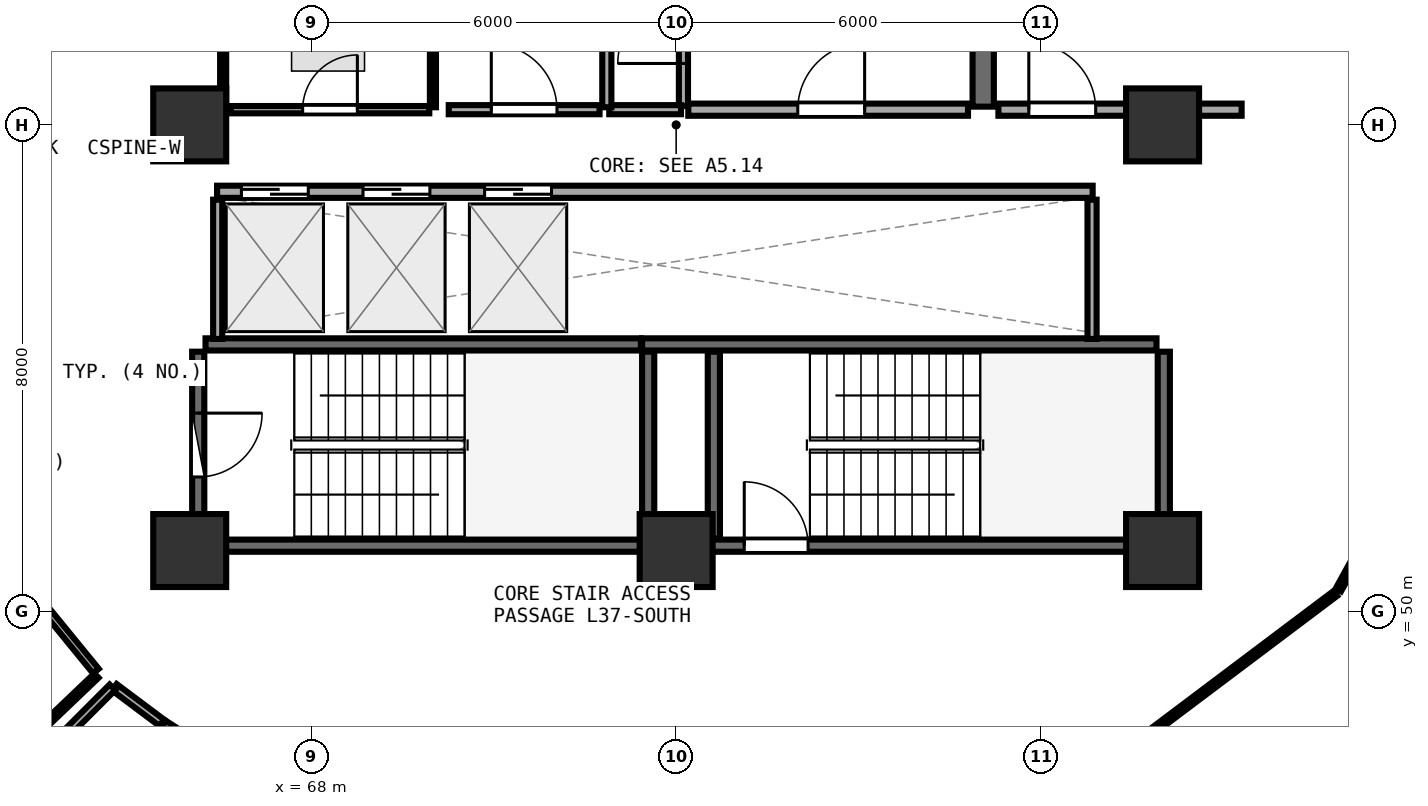
"""IFC4 building model, lengths in metres.
Left out: names, types, materials, properties, quantities, classifications, styles, units other than length and angle.
Written with IfcOpenShell. Run it as: python <this file> out.ifc"""

import sys

from ifc_helpers import new_model, si_unit, direction, frame, frame_2d, origin, origin_2d, place, context, subcontext, project, spatial, rectangle, extrude, element, fill, save


model = new_model("IFC4")
c1 = context("Model", 3, precision=1e-05, world=origin(), true_north=direction((0.0, 1.0)))
c2 = subcontext(c1, "Body", "Model", "MODEL_VIEW")
j1 = project(units=[si_unit("LENGTHUNIT", "METRE"), si_unit("PLANEANGLEUNIT", "RADIAN")], contexts=[c1])
p1 = place(None, origin())
s1 = spatial("IfcSite", under=j1, at=p1, CompositionType="ELEMENT")
p2 = place(p1, origin())
s2 = spatial("IfcBuilding", under=s1, at=p2, CompositionType="ELEMENT")
p3 = place(p2, frame((0.0, 0.0, 146.85)))
s3 = spatial("IfcBuildingStorey", under=s2, at=p3, CompositionType="ELEMENT", Elevation=146.85)
for number, where, z_axis, x_axis in (
    (1, (66.0, 51.0, 0.0), (0.0, 0.0, 1.0), (1.0, 0.0, 0.0)),
    (2, (74.0, 51.0, 0.0), (0.0, 0.0, 1.0), (1.0, 0.0, 0.0)),
    (3, (82.0, 51.0, 0.0), (0.0, 0.0, 1.0), (1.0, 0.0, 0.0)),
    (4, (82.0, 58.0, 0.0), (0.0, 0.0, 1.0), (1.0, 0.0, 0.0)),
    (5, (66.0, 58.0, 0.0), (0.0, 0.0, 1.0), (1.0, 0.0, 0.0)),
):
    element("IfcColumn", number, at=place(p3, frame(where, z_axis=z_axis, x_axis=x_axis)), inside=s3, PredefinedType="PILASTER", context=c2, shape_type="SweptSolid", body=[
        extrude(rectangle(XDim=1.2, YDim=1.2, at=origin_2d()), origin(), (0.0, 0.0, 1.0), 3.75),
    ])
p4 = place(p3, frame((74.0, 51.08, 0.0), z_axis=(0.0, 0.0, 1.0), x_axis=(1.0, 0.0, 0.0)))
e6 = element("IfcWall", 6, at=p4, inside=s3, PredefinedType="SHEAR", context=c2, shape_type="SweptSolid", body=[
    extrude(rectangle(XDim=7.9, YDim=0.2, at=frame_2d((3.95, 0.0))), origin(), (0.0, 0.0, 1.0), 3.49),
])
p5 = place(p4, frame((1.12, 0.0, 0.0)))
e7 = element("IfcOpeningElement", 7, at=p5, cuts=e6, PredefinedType="OPENING", context=c2, shape_type="SweptSolid", body=[
    extrude(rectangle(XDim=1.05, YDim=2.1, at=frame_2d((0.525, 1.05))), frame((0.0, 0.11, 0.0), z_axis=(0.0, -1.0, 0.0), x_axis=(1.0, 0.0, 0.0)), (0.0, 0.0, 1.0), 0.22),
])
p6 = place(p3, frame((82.02, 51.2, 0.0), z_axis=(0.0, 0.0, 1.0), x_axis=(0.0, 1.0, 0.0)))
e8 = element("IfcWall", 8, at=p6, inside=s3, PredefinedType="SHEAR", context=c2, shape_type="SweptSolid", body=[
    extrude(rectangle(XDim=3.07, YDim=0.2, at=frame_2d((1.535, 0.0))), origin(), (0.0, 0.0, 1.0), 3.49),
])
p7 = place(p3, frame((81.9, 54.39, 0.0), z_axis=(0.0, 0.0, 1.0), x_axis=(-1.0, 0.0, 0.0)))
e9 = element("IfcWall", 9, at=p7, inside=s3, PredefinedType="SHEAR", context=c2, shape_type="SweptSolid", body=[
    extrude(rectangle(XDim=8.46, YDim=0.2, at=frame_2d((4.23, 0.0))), origin(), (0.0, 0.0, 1.0), 3.49),
])
p8 = place(p3, frame((74.62, 54.27, 0.0), z_axis=(0.0, 0.0, 1.0), x_axis=(0.0, -1.0, 0.0)))
e10 = element("IfcWall", 10, at=p8, inside=s3, PredefinedType="SHEAR", context=c2, shape_type="SweptSolid", body=[
    extrude(rectangle(XDim=3.07, YDim=0.2, at=frame_2d((1.535, 0.0))), origin(), (0.0, 0.0, 1.0), 3.49),
])
p9 = place(p3, frame((66.26, 51.08, 0.0), z_axis=(0.0, 0.0, 1.0), x_axis=(1.0, 0.0, 0.0)))
e11 = element("IfcWall", 11, at=p9, inside=s3, PredefinedType="SHEAR", context=c2, shape_type="SweptSolid", body=[
    extrude(rectangle(XDim=7.16, YDim=0.2, at=frame_2d((3.58, 0.0))), origin(), (0.0, 0.0, 1.0), 3.49),
])
p10 = place(p3, frame((73.54, 51.2, 0.0), z_axis=(0.0, 0.0, 1.0), x_axis=(0.0, 1.0, 0.0)))
e12 = element("IfcWall", 12, at=p10, inside=s3, PredefinedType="SHEAR", context=c2, shape_type="SweptSolid", body=[
    extrude(rectangle(XDim=3.07, YDim=0.2, at=frame_2d((1.535, 0.0))), origin(), (0.0, 0.0, 1.0), 3.49),
])
p11 = place(p3, frame((73.42, 54.39, 0.0), z_axis=(0.0, 0.0, 1.0), x_axis=(-1.0, 0.0, 0.0)))
e13 = element("IfcWall", 13, at=p11, inside=s3, PredefinedType="SHEAR", context=c2, shape_type="SweptSolid", body=[
    extrude(rectangle(XDim=7.16, YDim=0.2, at=frame_2d((3.58, 0.0))), origin(), (0.0, 0.0, 1.0), 3.49),
])
p12 = place(p3, frame((66.14, 54.27, 0.0), z_axis=(0.0, 0.0, 1.0), x_axis=(0.0, -1.0, 0.0)))
e14 = element("IfcWall", 14, at=p12, inside=s3, PredefinedType="SHEAR", context=c2, shape_type="SweptSolid", body=[
    extrude(rectangle(XDim=3.07, YDim=0.2, at=frame_2d((1.535, 0.0))), origin(), (0.0, 0.0, 1.0), 3.49),
])
p13 = place(p12, frame((1.01, 0.0, 0.0)))
e15 = element("IfcOpeningElement", 15, at=p13, cuts=e14, PredefinedType="OPENING", context=c2, shape_type="SweptSolid", body=[
    extrude(rectangle(XDim=1.05, YDim=2.1, at=frame_2d((0.525, 1.05))), frame((0.0, 0.11, 0.0), z_axis=(0.0, -1.0, 0.0), x_axis=(1.0, 0.0, 0.0)), (0.0, 0.0, 1.0), 0.22),
])
p14 = place(p3, frame((79.05, 58.3, 0.0), z_axis=(0.0, 0.0, 1.0), x_axis=(0.0, 1.0, 0.0)))
e16 = element("IfcWall", 16, at=p14, inside=s3, PredefinedType="SHEAR", context=c2, shape_type="SweptSolid", body=[
    extrude(rectangle(XDim=6.3, YDim=0.35, at=frame_2d((3.15, 0.0))), origin(), (0.0, 0.0, 1.0), 3.49),
])
p15 = place(p3, frame((74.2, 58.25, 0.0), z_axis=(0.0, 0.0, 1.0), x_axis=(1.0, 0.0, 0.0)))
e17 = element("IfcWall", 17, at=p15, inside=s3, PredefinedType="SOLIDWALL", context=c2, shape_type="SweptSolid", body=[
    extrude(rectangle(XDim=4.6, YDim=0.2, at=frame_2d((2.3, 0.0))), origin(), (0.0, 0.0, 1.0), 3.48),
])
p16 = place(p15, frame((1.8, 0.0, 0.0)))
e18 = element("IfcOpeningElement", 18, at=p16, cuts=e17, PredefinedType="OPENING", context=c2, shape_type="SweptSolid", body=[
    extrude(rectangle(XDim=1.1, YDim=2.1, at=frame_2d((0.55, 1.05))), frame((0.0, 0.11, 0.0), z_axis=(0.0, -1.0, 0.0), x_axis=(1.0, 0.0, 0.0)), (0.0, 0.0, 1.0), 0.22),
])
p17 = place(p3, frame((79.3, 58.25, 0.0), z_axis=(0.0, 0.0, 1.0), x_axis=(1.0, 0.0, 0.0)))
e19 = element("IfcWall", 19, at=p17, inside=s3, PredefinedType="SOLIDWALL", context=c2, shape_type="SweptSolid", body=[
    extrude(rectangle(XDim=4.0, YDim=0.2, at=frame_2d((2.0, 0.0))), origin(), (0.0, 0.0, 1.0), 2.775),
])
p18 = place(p17, frame((0.5, 0.0, 0.0)))
e20 = element("IfcOpeningElement", 20, at=p18, cuts=e19, PredefinedType="OPENING", context=c2, shape_type="SweptSolid", body=[
    extrude(rectangle(XDim=1.1, YDim=2.1, at=frame_2d((0.55, 1.05))), frame((0.0, 0.11, 0.0), z_axis=(0.0, -1.0, 0.0), x_axis=(1.0, 0.0, 0.0)), (0.0, 0.0, 1.0), 0.22),
])
p19 = place(p3, frame((66.45, 56.9, 0.0), z_axis=(0.0, 0.0, 1.0), x_axis=(1.0, 0.0, 0.0)))
e21 = element("IfcWall", 21, at=p19, inside=s3, PredefinedType="SOLIDWALL", context=c2, shape_type="SweptSolid", body=[
    extrude(rectangle(XDim=14.4, YDim=0.2, at=frame_2d((7.2, 0.0))), origin(), (0.0, 0.0, 1.0), 3.48),
])
p20 = place(p19, frame((0.4, 0.0, 0.0)))
e22 = element("IfcOpeningElement", 22, at=p20, cuts=e21, PredefinedType="OPENING", context=c2, shape_type="SweptSolid", body=[
    extrude(rectangle(XDim=1.1, YDim=2.1, at=frame_2d((0.55, 1.05))), frame((0.0, 0.11, 0.0), z_axis=(0.0, -1.0, 0.0), x_axis=(1.0, 0.0, 0.0)), (0.0, 0.0, 1.0), 0.22),
])
p21 = place(p19, frame((2.4, 0.0, 0.0)))
e23 = element("IfcOpeningElement", 23, at=p21, cuts=e21, PredefinedType="OPENING", context=c2, shape_type="SweptSolid", body=[
    extrude(rectangle(XDim=1.1, YDim=2.1, at=frame_2d((0.55, 1.05))), frame((0.0, 0.11, 0.0), z_axis=(0.0, -1.0, 0.0), x_axis=(1.0, 0.0, 0.0)), (0.0, 0.0, 1.0), 0.22),
])
p22 = place(p19, frame((4.4, 0.0, 0.0)))
e24 = element("IfcOpeningElement", 24, at=p22, cuts=e21, PredefinedType="OPENING", context=c2, shape_type="SweptSolid", body=[
    extrude(rectangle(XDim=1.1, YDim=2.1, at=frame_2d((0.55, 1.05))), frame((0.0, 0.11, 0.0), z_axis=(0.0, -1.0, 0.0), x_axis=(1.0, 0.0, 0.0)), (0.0, 0.0, 1.0), 0.22),
])
for number, where, z_axis, x_axis in (
    (25, (66.46, 54.48, 0.0), (0.0, 0.0, 1.0), (0.0, 1.0, 0.0)),
    (26, (80.84, 54.48, 0.0), (0.0, 0.0, 1.0), (0.0, 1.0, 0.0)),
):
    element("IfcWall", number, at=place(p3, frame(where, z_axis=z_axis, x_axis=x_axis)), inside=s3, PredefinedType="PARTITIONING", context=c2, shape_type="SweptSolid", body=[
        extrude(rectangle(XDim=2.29, YDim=0.15, at=frame_2d((1.145, 0.0))), origin(), (0.0, 0.0, 1.0), 3.48),
    ])
p23 = place(p3, frame((74.12, 58.31, 0.0), z_axis=(0.0, 0.0, 1.0), x_axis=(0.0, 1.0, 0.0)))
e27 = element("IfcWall", 27, at=p23, inside=s3, PredefinedType="PARTITIONING", context=c2, shape_type="SweptSolid", body=[
    extrude(rectangle(XDim=2.48, YDim=0.15, at=frame_2d((1.24, 0.0))), origin(), (0.0, 0.0, 1.0), 3.48),
])
p24 = place(p23, frame((0.7, 0.0, 0.0)))
e28 = element("IfcOpeningElement", 28, at=p24, cuts=e27, PredefinedType="OPENING", context=c2, shape_type="SweptSolid", body=[
    extrude(rectangle(XDim=1.08, YDim=2.1, at=frame_2d((0.54, 1.05))), frame((0.0, 0.085, 0.0), z_axis=(0.0, -1.0, 0.0), x_axis=(1.0, 0.0, 0.0)), (0.0, 0.0, 1.0), 0.17),
])
p25 = place(p3, frame((66.675, 58.25, 0.0), z_axis=(0.0, 0.0, 1.0), x_axis=(1.0, 0.0, 0.0)))
e29 = element("IfcWall", 29, at=p25, inside=s3, PredefinedType="PARTITIONING", context=c2, shape_type="SweptSolid", body=[
    extrude(rectangle(XDim=3.265, YDim=0.12, at=frame_2d((1.632, 0.0))), origin(), (0.0, 0.0, 1.0), 3.48),
])
p26 = place(p25, frame((1.182, 0.0, 0.0)))
e30 = element("IfcOpeningElement", 30, at=p26, cuts=e29, PredefinedType="OPENING", context=c2, shape_type="SweptSolid", body=[
    extrude(rectangle(XDim=0.9, YDim=2.08, at=frame_2d((0.45, 1.04))), frame((0.0, 0.07, 0.0), z_axis=(0.0, -1.0, 0.0), x_axis=(1.0, 0.0, 0.0)), (0.0, 0.0, 1.0), 0.14),
])
p27 = place(p3, frame((70.26, 58.25, 0.0), z_axis=(0.0, 0.0, 1.0), x_axis=(1.0, 0.0, 0.0)))
e31 = element("IfcWall", 31, at=p27, inside=s3, PredefinedType="PARTITIONING", context=c2, shape_type="SweptSolid", body=[
    extrude(rectangle(XDim=2.48, YDim=0.15, at=frame_2d((1.24, 0.0))), origin(), (0.0, 0.0, 1.0), 3.48),
])
p28 = place(p27, frame((0.7, 0.0, 0.0)))
e32 = element("IfcOpeningElement", 32, at=p28, cuts=e31, PredefinedType="OPENING", context=c2, shape_type="SweptSolid", body=[
    extrude(rectangle(XDim=1.08, YDim=2.1, at=frame_2d((0.54, 1.05))), frame((0.0, 0.085, 0.0), z_axis=(0.0, -1.0, 0.0), x_axis=(1.0, 0.0, 0.0)), (0.0, 0.0, 1.0), 0.17),
])
p29 = place(p3, frame((61.604, 52.511, 0.0), z_axis=(0.0, 0.0, 1.0), x_axis=(0.632491819148, -0.77456703952, 0.0)))
e33 = element("IfcWall", 33, at=p29, inside=s3, PredefinedType="PARTITIONING", context=c2, shape_type="SweptSolid", body=[
    extrude(rectangle(XDim=4.511, YDim=0.12, at=frame_2d((2.255, 0.0))), origin(), (0.0, 0.0, 1.0), 2.975),
])
p30 = place(p29, frame((1.805, 0.0, 0.0)))
e34 = element("IfcOpeningElement", 34, at=p30, cuts=e33, PredefinedType="OPENING", context=c2, shape_type="SweptSolid", body=[
    extrude(rectangle(XDim=0.9, YDim=2.08, at=frame_2d((0.45, 1.04))), frame((0.0, 0.07, 0.0), z_axis=(0.0, -1.0, 0.0), x_axis=(1.0, 0.0, 0.0)), (0.0, 0.0, 1.0), 0.14),
])
p31 = place(p3, frame((72.9, 58.25, 0.0), z_axis=(0.0, 0.0, 1.0), x_axis=(1.0, 0.0, 0.0)))
e35 = element("IfcWall", 35, at=p31, inside=s3, PredefinedType="PARTITIONING", context=c2, shape_type="SweptSolid", body=[
    extrude(rectangle(XDim=1.18, YDim=0.15, at=frame_2d((0.59, 0.0))), origin(), (0.0, 0.0, 1.0), 3.48),
])
p32 = place(p3, frame((72.86, 60.81, 0.0), z_axis=(0.0, 0.0, 1.0), x_axis=(0.0, -1.0, 0.0)))
e36 = element("IfcWall", 36, at=p32, inside=s3, PredefinedType="PARTITIONING", context=c2, shape_type="SweptSolid", body=[
    extrude(rectangle(XDim=2.52, YDim=0.15, at=frame_2d((1.26, 0.0))), origin(), (0.0, 0.0, 1.0), 3.48),
])
p33 = place(p3, frame((70.0, 58.29, 0.0), z_axis=(0.0, 0.0, 1.0), x_axis=(0.0, 1.0, 0.0)))
e37 = element("IfcWall", 37, at=p33, inside=s3, PredefinedType="PARTITIONING", context=c2, shape_type="SweptSolid", body=[
    extrude(rectangle(XDim=2.39, YDim=0.1, at=frame_2d((1.195, 0.0))), origin(), (0.0, 0.0, 1.0), 3.48),
])
p34 = place(p3, frame((66.55, 60.68, 0.0), z_axis=(0.0, 0.0, 1.0), x_axis=(0.0, -1.0, 0.0)))
e38 = element("IfcWall", 38, at=p34, inside=s3, PredefinedType="PARTITIONING", context=c2, shape_type="SweptSolid", body=[
    extrude(rectangle(XDim=2.383, YDim=0.1, at=frame_2d((1.191, 0.0))), origin(), (0.0, 0.0, 1.0), 3.48),
])
p35 = place(p3, frame((80.535, 47.054, 0.0), z_axis=(0.0, 0.0, 1.0), x_axis=(0.799096406603, 0.601202904979, 0.0)))
e39 = element("IfcWall", 39, at=p35, inside=s3, PredefinedType="PARTITIONING", context=c2, shape_type="SweptSolid", body=[
    extrude(rectangle(XDim=5.387, YDim=0.1, at=frame_2d((2.694, 0.0))), origin(), (0.0, 0.0, 1.0), 2.975),
])
p36 = place(p3, frame((84.891, 50.352, 0.0), z_axis=(0.0, 0.0, 1.0), x_axis=(0.481680787808, 0.876346745676, 0.0)))
e40 = element("IfcWall", 40, at=p36, inside=s3, PredefinedType="PARTITIONING", context=c2, shape_type="SweptSolid", body=[
    extrude(rectangle(XDim=5.16, YDim=0.1, at=frame_2d((2.58, 0.0))), origin(), (0.0, 0.0, 1.0), 2.975),
])
p37 = place(p3, frame((64.466, 48.943, 0.0), z_axis=(0.0, 0.0, 1.0), x_axis=(-0.723511266615, -0.690312572014, 0.0)))
e41 = element("IfcWall", 41, at=p37, inside=s3, PredefinedType="PARTITIONING", context=c2, shape_type="SweptSolid", body=[
    extrude(rectangle(XDim=7.758, YDim=0.1, at=frame_2d((3.879, 0.0))), origin(), (0.0, 0.0, 1.0), 3.025),
])
p38 = place(p3, frame((64.759, 48.753, 0.0), z_axis=(0.0, 0.0, 1.0), x_axis=(0.800390142897, -0.599479456824, 0.0)))
e42 = element("IfcWall", 42, at=p38, inside=s3, PredefinedType="PLUMBINGWALL", context=c2, shape_type="SweptSolid", body=[
    extrude(rectangle(XDim=0.976, YDim=0.13, at=frame_2d((0.488, 0.0))), origin(), (0.0, 0.0, 1.0), 2.975),
])
p39 = place(p3, frame((65.573, 48.145, 0.0), z_axis=(0.0, 0.0, 1.0), x_axis=(0.842104586495, -0.539314254776, 0.0)))
e43 = element("IfcWall", 43, at=p39, inside=s3, PredefinedType="PLUMBINGWALL", context=c2, shape_type="SweptSolid", body=[
    extrude(rectangle(XDim=0.984, YDim=0.13, at=frame_2d((0.492, 0.0))), origin(), (0.0, 0.0, 1.0), 3.48),
])
p40 = place(p3, frame((62.713, 46.733, 0.0), z_axis=(0.0, 0.0, 1.0), x_axis=(0.706764315195, 0.707449081396, 0.0)))
e44 = element("IfcWall", 44, at=p40, inside=s3, PredefinedType="PLUMBINGWALL", context=c2, shape_type="SweptSolid", body=[
    extrude(rectangle(XDim=2.852, YDim=0.13, at=frame_2d((1.426, 0.0))), origin(), (0.0, 0.0, 1.0), 3.235),
])
p41 = place(p5, origin())
e45 = element("IfcDoor", 45, at=p41, inside=s3, OperationType="SINGLE_SWING_LEFT", PredefinedType="DOOR", context=c2, shape_type="SweptSolid", body=[
    extrude(rectangle(XDim=1.05, YDim=2.1, at=frame_2d((0.525, 1.05))), frame((0.0, 0.025, 0.0), z_axis=(0.0, -1.0, 0.0), x_axis=(1.0, 0.0, 0.0)), (0.0, 0.0, 1.0), 0.05),
])
fill(e7, e45)
p42 = place(p13, origin())
e46 = element("IfcDoor", 46, at=p42, inside=s3, OperationType="SINGLE_SWING_LEFT", PredefinedType="DOOR", context=c2, shape_type="SweptSolid", body=[
    extrude(rectangle(XDim=1.05, YDim=2.1, at=frame_2d((0.525, 1.05))), frame((0.0, 0.025, 0.0), z_axis=(0.0, -1.0, 0.0), x_axis=(1.0, 0.0, 0.0)), (0.0, 0.0, 1.0), 0.05),
])
fill(e15, e46)
p43 = place(p16, frame((1.1, 0.0, 0.0), z_axis=(0.0, 0.0, 1.0), x_axis=(-1.0, 0.0, 0.0)))
e47 = element("IfcDoor", 47, at=p43, inside=s3, OperationType="SINGLE_SWING_LEFT", PredefinedType="DOOR", context=c2, shape_type="SweptSolid", body=[
    extrude(rectangle(XDim=1.1, YDim=2.1, at=frame_2d((0.55, 1.05))), frame((0.0, 0.025, 0.0), z_axis=(0.0, -1.0, 0.0), x_axis=(1.0, 0.0, 0.0)), (0.0, 0.0, 1.0), 0.05),
])
fill(e18, e47)
p44 = place(p18, frame((1.1, 0.0, 0.0), z_axis=(0.0, 0.0, 1.0), x_axis=(-1.0, 0.0, 0.0)))
e48 = element("IfcDoor", 48, at=p44, inside=s3, OperationType="SINGLE_SWING_RIGHT", PredefinedType="DOOR", context=c2, shape_type="SweptSolid", body=[
    extrude(rectangle(XDim=1.1, YDim=2.1, at=frame_2d((0.55, 1.05))), frame((0.0, 0.025, 0.0), z_axis=(0.0, -1.0, 0.0), x_axis=(1.0, 0.0, 0.0)), (0.0, 0.0, 1.0), 0.05),
])
fill(e20, e48)
p45 = place(p20, origin())
e49 = element("IfcDoor", 49, at=p45, inside=s3, OperationType="DOUBLE_DOOR_SLIDING", PredefinedType="DOOR", context=c2, shape_type="SweptSolid", body=[
    extrude(rectangle(XDim=1.1, YDim=2.1, at=frame_2d((0.55, 1.05))), frame((0.0, 0.025, 0.0), z_axis=(0.0, -1.0, 0.0), x_axis=(1.0, 0.0, 0.0)), (0.0, 0.0, 1.0), 0.05),
])
fill(e22, e49)
p46 = place(p21, origin())
e50 = element("IfcDoor", 50, at=p46, inside=s3, OperationType="DOUBLE_DOOR_SLIDING", PredefinedType="DOOR", context=c2, shape_type="SweptSolid", body=[
    extrude(rectangle(XDim=1.1, YDim=2.1, at=frame_2d((0.55, 1.05))), frame((0.0, 0.025, 0.0), z_axis=(0.0, -1.0, 0.0), x_axis=(1.0, 0.0, 0.0)), (0.0, 0.0, 1.0), 0.05),
])
fill(e23, e50)
p47 = place(p22, origin())
e51 = element("IfcDoor", 51, at=p47, inside=s3, OperationType="DOUBLE_DOOR_SLIDING", PredefinedType="DOOR", context=c2, shape_type="SweptSolid", body=[
    extrude(rectangle(XDim=1.1, YDim=2.1, at=frame_2d((0.55, 1.05))), frame((0.0, 0.025, 0.0), z_axis=(0.0, -1.0, 0.0), x_axis=(1.0, 0.0, 0.0)), (0.0, 0.0, 1.0), 0.05),
])
fill(e24, e51)
p48 = place(p24, origin())
e52 = element("IfcDoor", 52, at=p48, inside=s3, OperationType="SINGLE_SWING_LEFT", PredefinedType="DOOR", context=c2, shape_type="SweptSolid", body=[
    extrude(rectangle(XDim=1.08, YDim=2.1, at=frame_2d((0.54, 1.05))), frame((0.0, 0.025, 0.0), z_axis=(0.0, -1.0, 0.0), x_axis=(1.0, 0.0, 0.0)), (0.0, 0.0, 1.0), 0.05),
])
fill(e28, e52)
p49 = place(p26, origin())
e53 = element("IfcDoor", 53, at=p49, inside=s3, OperationType="SINGLE_SWING_RIGHT", PredefinedType="DOOR", context=c2, shape_type="SweptSolid", body=[
    extrude(rectangle(XDim=0.9, YDim=2.08, at=frame_2d((0.45, 1.04))), frame((0.0, 0.025, 0.0), z_axis=(0.0, -1.0, 0.0), x_axis=(1.0, 0.0, 0.0)), (0.0, 0.0, 1.0), 0.05),
])
fill(e30, e53)
p50 = place(p28, origin())
e54 = element("IfcDoor", 54, at=p50, inside=s3, OperationType="SINGLE_SWING_LEFT", PredefinedType="DOOR", context=c2, shape_type="SweptSolid", body=[
    extrude(rectangle(XDim=1.08, YDim=2.1, at=frame_2d((0.54, 1.05))), frame((0.0, 0.025, 0.0), z_axis=(0.0, -1.0, 0.0), x_axis=(1.0, 0.0, 0.0)), (0.0, 0.0, 1.0), 0.05),
])
fill(e32, e54)
save(model, sys.argv[1])
